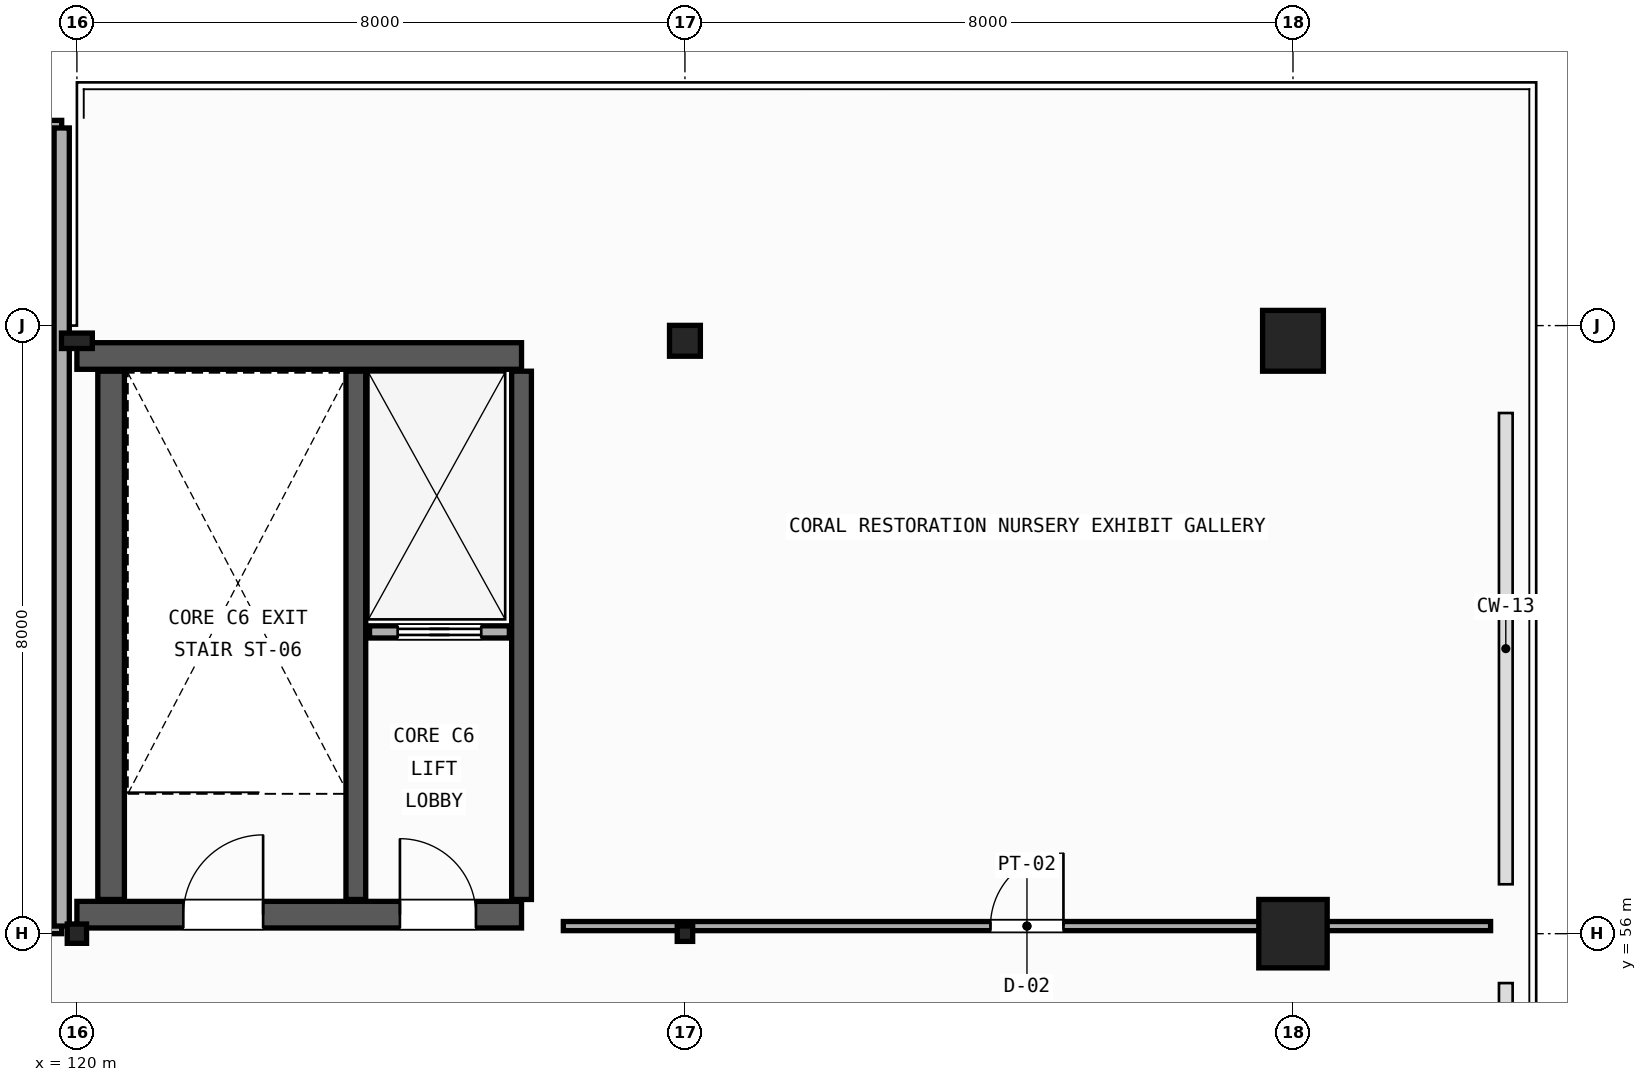
"""IFC4 building model, lengths in metres.
Left out: names, types, materials, properties, quantities, classifications, styles, units other than length and angle.
Written with IfcOpenShell. Run it as: python <this file> out.ifc"""

import sys

from ifc_helpers import new_model, si_unit, direction, frame, frame_2d, origin, origin_2d, place, context, subcontext, project, spatial, rectangle, hollow_rectangle, hollow_circle, i_section, extrude, element, fill, save


model = new_model("IFC4")
c1 = context("Model", 3, precision=1e-05, world=origin(), true_north=direction((0.0, 1.0)))
c2 = subcontext(c1, "Body", "Model", "MODEL_VIEW")
j1 = project(units=[si_unit("LENGTHUNIT", "METRE"), si_unit("PLANEANGLEUNIT", "RADIAN")], contexts=[c1])
p1 = place(None, origin())
s1 = spatial("IfcSite", under=j1, at=p1, CompositionType="ELEMENT")
p2 = place(p1, origin())
s2 = spatial("IfcBuilding", under=s1, at=p2, CompositionType="ELEMENT")
p3 = place(p2, frame((0.0, 0.0, 10.2)))
s3 = spatial("IfcBuildingStorey", under=s2, at=p3, CompositionType="ELEMENT", Elevation=10.2)
p4 = place(p3, frame((120.0, 56.0, 0.0), z_axis=(0.0, 0.0, 1.0), x_axis=(1.0, 0.0, 0.0)))
e1 = element("IfcColumn", 1, at=p4, inside=s3, PredefinedType="COLUMN", context=c2, shape_type="SweptSolid", body=[
    extrude(i_section(OverallWidth=0.254, OverallDepth=0.254, WebThickness=0.009, FlangeThickness=0.014, FilletRadius=0.011, at=origin_2d()), origin(), (0.0, 0.0, 1.0), 4.8),
])
p5 = place(p3, frame((120.0, 63.8, 0.0), z_axis=(0.0, 0.0, 1.0), x_axis=(0.0, 1.0, 0.0)))
e2 = element("IfcColumn", 2, at=p5, inside=s3, PredefinedType="COLUMN", context=c2, shape_type="SweptSolid", body=[
    extrude(hollow_rectangle(XDim=0.203, YDim=0.406, WallThickness=0.012, InnerFilletRadius=0.012, OuterFilletRadius=0.024, at=origin_2d()), origin(), (0.0, 0.0, 1.0), 4.8),
])
p6 = place(p3, frame((128.0, 56.0, 0.0), z_axis=(0.0, 0.0, 1.0), x_axis=(0.0, 1.0, 0.0)))
e3 = element("IfcColumn", 3, at=p6, inside=s3, PredefinedType="COLUMN", context=c2, shape_type="SweptSolid", body=[
    extrude(hollow_rectangle(XDim=0.203, YDim=0.203, WallThickness=0.009, InnerFilletRadius=0.009, OuterFilletRadius=0.018, at=origin_2d()), origin(), (0.0, 0.0, 1.0), 7.05),
])
p7 = place(p3, frame((128.0, 63.8, 0.0), z_axis=(0.0, 0.0, 1.0), x_axis=(1.0, 0.0, 0.0)))
e4 = element("IfcColumn", 4, at=p7, inside=s3, PredefinedType="COLUMN", context=c2, shape_type="SweptSolid", body=[
    extrude(hollow_circle(Radius=0.203, WallThickness=0.012, at=origin_2d()), origin(), (0.0, 0.0, 1.0), 7.05),
])
p8 = place(p3, frame((136.0, 56.0, 0.0), z_axis=(0.0, 0.0, 1.0), x_axis=(1.0, 0.0, 0.0)))
e5 = element("IfcColumn", 5, at=p8, inside=s3, PredefinedType="COLUMN", context=c2, shape_type="SweptSolid", body=[
    extrude(rectangle(XDim=0.9, YDim=0.9, at=origin_2d()), origin(), (0.0, 0.0, 1.0), 4.8),
])
p9 = place(p3, frame((136.0, 63.8, 0.0), z_axis=(0.0, 0.0, 1.0), x_axis=(0.0, 1.0, 0.0)))
e6 = element("IfcColumn", 6, at=p9, inside=s3, PredefinedType="COLUMN", context=c2, shape_type="SweptSolid", body=[
    extrude(rectangle(XDim=0.8, YDim=0.8, at=origin_2d()), origin(), (0.0, 0.0, 1.0), 4.8),
])
p10 = place(p3, frame((120.0, 56.25, 0.0), z_axis=(0.0, 0.0, 1.0), x_axis=(1.0, 0.0, 0.0)))
e7 = element("IfcWall", 7, at=p10, inside=s3, PredefinedType="SHEAR", context=c2, shape_type="SweptSolid", body=[
    extrude(rectangle(XDim=5.85, YDim=0.35, at=frame_2d((2.925, 0.0))), origin(), (0.0, 0.0, 1.0), 4.3),
])
p11 = place(p10, frame((1.4, 0.0, 0.0)))
e8 = element("IfcOpeningElement", 8, at=p11, cuts=e7, PredefinedType="OPENING", context=c2, shape_type="SweptSolid", body=[
    extrude(rectangle(XDim=1.05, YDim=2.1, at=frame_2d((0.525, 1.05))), frame((0.0, 0.185, 0.0), z_axis=(0.0, -1.0, 0.0), x_axis=(1.0, 0.0, 0.0)), (0.0, 0.0, 1.0), 0.37),
])
p12 = place(p10, frame((4.25, 0.0, 0.0)))
e9 = element("IfcOpeningElement", 9, at=p12, cuts=e7, PredefinedType="OPENING", context=c2, shape_type="SweptSolid", body=[
    extrude(rectangle(XDim=1.0, YDim=2.15, at=frame_2d((0.5, 1.075))), frame((0.0, 0.185, 0.0), z_axis=(0.0, -1.0, 0.0), x_axis=(1.0, 0.0, 0.0)), (0.0, 0.0, 1.0), 0.37),
])
p13 = place(p3, frame((120.0, 63.6, 0.0), z_axis=(0.0, 0.0, 1.0), x_axis=(1.0, 0.0, 0.0)))
e10 = element("IfcWall", 10, at=p13, inside=s3, PredefinedType="SHEAR", context=c2, shape_type="SweptSolid", body=[
    extrude(rectangle(XDim=5.85, YDim=0.35, at=frame_2d((2.925, 0.0))), origin(), (0.0, 0.0, 1.0), 4.3),
])
p14 = place(p3, frame((120.45, 56.45, 0.0), z_axis=(0.0, 0.0, 1.0), x_axis=(0.0, 1.0, 0.0)))
e11 = element("IfcWall", 11, at=p14, inside=s3, PredefinedType="SHEAR", context=c2, shape_type="SweptSolid", body=[
    extrude(rectangle(XDim=6.95, YDim=0.35, at=frame_2d((3.475, 0.0))), origin(), (0.0, 0.0, 1.0), 4.3),
])
for number, where, z_axis, x_axis in (
    (12, (125.85, 56.45, 0.0), (0.0, 0.0, 1.0), (0.0, 1.0, 0.0)),
    (13, (123.67, 56.45, 0.0), (0.0, 0.0, 1.0), (0.0, 1.0, 0.0)),
):
    element("IfcWall", number, at=place(p3, frame(where, z_axis=z_axis, x_axis=x_axis)), inside=s3, PredefinedType="SHEAR", context=c2, shape_type="SweptSolid", body=[
        extrude(rectangle(XDim=6.95, YDim=0.26, at=frame_2d((3.475, 0.0))), origin(), (0.0, 0.0, 1.0), 4.3),
    ])
p15 = place(p3, frame((123.85, 59.97, 0.0), z_axis=(0.0, 0.0, 1.0), x_axis=(1.0, 0.0, 0.0)))
e14 = element("IfcWall", 14, at=p15, inside=s3, PredefinedType="PARTITIONING", context=c2, shape_type="SweptSolid", body=[
    extrude(rectangle(XDim=1.84, YDim=0.16, at=frame_2d((0.92, 0.0))), origin(), (0.0, 0.0, 1.0), 3.6),
])
p16 = place(p15, frame((0.37, 0.0, 0.0)))
e15 = element("IfcOpeningElement", 15, at=p16, cuts=e14, PredefinedType="OPENING", context=c2, shape_type="SweptSolid", body=[
    extrude(rectangle(XDim=1.1, YDim=2.15, at=frame_2d((0.55, 1.075))), frame((0.0, 0.09, 0.0), z_axis=(0.0, -1.0, 0.0), x_axis=(1.0, 0.0, 0.0)), (0.0, 0.0, 1.0), 0.18),
])
p17 = place(p3, frame((126.4, 56.1, 0.0), z_axis=(0.0, 0.0, 1.0), x_axis=(1.0, 0.0, 0.0)))
e16 = element("IfcWall", 16, at=p17, inside=s3, PredefinedType="PARTITIONING", context=c2, shape_type="SweptSolid", body=[
    extrude(rectangle(XDim=12.2, YDim=0.12, at=frame_2d((6.1, 0.0))), origin(), (0.0, 0.0, 1.0), 3.957),
])
p18 = place(p17, frame((5.62, 0.0, 0.0)))
e17 = element("IfcOpeningElement", 17, at=p18, cuts=e16, PredefinedType="OPENING", context=c2, shape_type="SweptSolid", body=[
    extrude(rectangle(XDim=0.96, YDim=2.1, at=frame_2d((0.48, 1.05))), frame((0.0, 0.07, 0.0), z_axis=(0.0, -1.0, 0.0), x_axis=(1.0, 0.0, 0.0)), (0.0, 0.0, 1.0), 0.14),
])
p19 = place(p3, frame((113.0, 56.1, 0.0), z_axis=(0.0, 0.0, 1.0), x_axis=(1.0, 0.0, 0.0)))
e18 = element("IfcWall", 18, at=p19, inside=s3, PredefinedType="PLUMBINGWALL", context=c2, shape_type="SweptSolid", body=[
    extrude(rectangle(XDim=6.8, YDim=0.2, at=frame_2d((3.4, 0.0))), origin(), (0.0, 0.0, 1.0), 4.29),
])
p20 = place(p19, frame((2.945, 0.0, 0.0)))
e19 = element("IfcOpeningElement", 19, at=p20, cuts=e18, PredefinedType="OPENING", context=c2, shape_type="SweptSolid", body=[
    extrude(rectangle(XDim=0.91, YDim=2.1, at=frame_2d((0.455, 1.05))), frame((0.0, 0.11, 0.0), z_axis=(0.0, -1.0, 0.0), x_axis=(1.0, 0.0, 0.0)), (0.0, 0.0, 1.0), 0.22),
])
p21 = place(p3, frame((113.0, 66.6, 0.0), z_axis=(0.0, 0.0, 1.0), x_axis=(1.0, 0.0, 0.0)))
e20 = element("IfcWall", 20, at=p21, inside=s3, PredefinedType="PLUMBINGWALL", context=c2, shape_type="SweptSolid", body=[
    extrude(rectangle(XDim=6.8, YDim=0.2, at=frame_2d((3.4, 0.0))), origin(), (0.0, 0.0, 1.0), 4.29),
])
p22 = place(p3, frame((119.8, 56.1, 0.0), z_axis=(0.0, 0.0, 1.0), x_axis=(0.0, 1.0, 0.0)))
e21 = element("IfcWall", 21, at=p22, inside=s3, PredefinedType="PLUMBINGWALL", context=c2, shape_type="SweptSolid", body=[
    extrude(rectangle(XDim=10.5, YDim=0.2, at=frame_2d((5.25, 0.0))), origin(), (0.0, 0.0, 1.0), 3.957),
])
p23 = place(p16, origin())
e22 = element("IfcDoor", 22, at=p23, inside=s3, OperationType="SLIDING_TO_LEFT", PredefinedType="DOOR", context=c2, shape_type="SweptSolid", body=[
    extrude(rectangle(XDim=1.1, YDim=2.15, at=frame_2d((0.55, 1.075))), frame((0.0, 0.025, 0.0), z_axis=(0.0, -1.0, 0.0), x_axis=(1.0, 0.0, 0.0)), (0.0, 0.0, 1.0), 0.05),
])
fill(e15, e22)
p24 = place(p11, origin())
e23 = element("IfcDoor", 23, at=p24, inside=s3, OperationType="SINGLE_SWING_RIGHT", PredefinedType="DOOR", context=c2, shape_type="SweptSolid", body=[
    extrude(rectangle(XDim=1.05, YDim=2.1, at=frame_2d((0.525, 1.05))), frame((0.0, 0.025, 0.0), z_axis=(0.0, -1.0, 0.0), x_axis=(1.0, 0.0, 0.0)), (0.0, 0.0, 1.0), 0.05),
])
fill(e8, e23)
p25 = place(p12, origin())
e24 = element("IfcDoor", 24, at=p25, inside=s3, OperationType="SINGLE_SWING_LEFT", PredefinedType="DOOR", context=c2, shape_type="SweptSolid", body=[
    extrude(rectangle(XDim=1.0, YDim=2.15, at=frame_2d((0.5, 1.075))), frame((0.0, 0.025, 0.0), z_axis=(0.0, -1.0, 0.0), x_axis=(1.0, 0.0, 0.0)), (0.0, 0.0, 1.0), 0.05),
])
fill(e9, e24)
p26 = place(p18, origin())
e25 = element("IfcDoor", 25, at=p26, inside=s3, OperationType="SINGLE_SWING_RIGHT", PredefinedType="DOOR", context=c2, shape_type="SweptSolid", body=[
    extrude(rectangle(XDim=0.96, YDim=2.1, at=frame_2d((0.48, 1.05))), frame((0.0, 0.025, 0.0), z_axis=(0.0, -1.0, 0.0), x_axis=(1.0, 0.0, 0.0)), (0.0, 0.0, 1.0), 0.05),
])
fill(e17, e25)
save(model, sys.argv[1])
